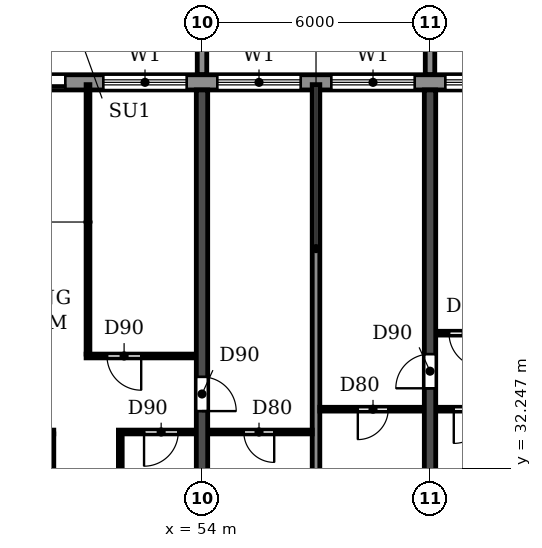
"""IFC4 building model, lengths in metres.
Left out: names, types, materials, properties, quantities, classifications, styles, units other than length and angle.
Written with IfcOpenShell. Run it as: python <this file> out.ifc"""

import sys

from ifc_helpers import new_model, si_unit, direction, frame, frame_2d, origin, place, context, subcontext, project, spatial, polyline, rectangle, outline, extrude, source, transform, mapped, element, fill, save


model = new_model("IFC4")
c1 = context("Model", 3, precision=1e-05, world=origin(), true_north=direction((0.0, 1.0)))
c2 = subcontext(c1, "Body", "Model", "MODEL_VIEW")
j1 = project(units=[si_unit("LENGTHUNIT", "METRE"), si_unit("PLANEANGLEUNIT", "RADIAN")], contexts=[c1])
p1 = place(None, origin())
s1 = spatial("IfcSite", under=j1, at=p1, CompositionType="ELEMENT")
p2 = place(p1, origin())
s2 = spatial("IfcBuilding", under=s1, at=p2, CompositionType="ELEMENT")
p3 = place(p2, frame((0.0, 0.0, 155.4)))
s3 = spatial("IfcBuildingStorey", under=s2, at=p3, CompositionType="ELEMENT", Elevation=155.4)
p4 = place(p3, frame((54.0, 30.525, 0.0), z_axis=(0.0, 0.0, 1.0), x_axis=(0.0, 1.0, 0.0)))
e1 = element("IfcWall", 1, at=p4, inside=s3, PredefinedType="SHEAR", context=c2, shape_type="SweptSolid", body=[
    extrude(rectangle(XDim=11.675, YDim=0.3, at=frame_2d((5.837, 0.0))), origin(), (0.0, 0.0, 1.0), 3.0),
])
p5 = place(p4, frame((3.225, 0.0, 0.0)))
e2 = element("IfcOpeningElement", 2, at=p5, cuts=e1, PredefinedType="OPENING", context=c2, shape_type="SweptSolid", body=[
    extrude(rectangle(XDim=0.9, YDim=2.1, at=frame_2d((0.45, 1.05))), frame((0.0, 0.16, 0.0), z_axis=(0.0, -1.0, 0.0), x_axis=(1.0, 0.0, 0.0)), (0.0, 0.0, 1.0), 0.32),
])
p6 = place(p3, frame((60.0, 30.525, 0.0), z_axis=(0.0, 0.0, 1.0), x_axis=(0.0, 1.0, 0.0)))
e3 = element("IfcWall", 3, at=p6, inside=s3, PredefinedType="SHEAR", context=c2, shape_type="SweptSolid", body=[
    extrude(rectangle(XDim=11.675, YDim=0.3, at=frame_2d((5.837, 0.0))), origin(), (0.0, 0.0, 1.0), 3.0),
])
p7 = place(p6, frame((3.825, 0.0, 0.0)))
e4 = element("IfcOpeningElement", 4, at=p7, cuts=e3, PredefinedType="OPENING", context=c2, shape_type="SweptSolid", body=[
    extrude(rectangle(XDim=0.9, YDim=2.1, at=frame_2d((0.45, 1.05))), frame((0.0, 0.16, 0.0), z_axis=(0.0, -1.0, 0.0), x_axis=(1.0, 0.0, 0.0)), (0.0, 0.0, 1.0), 0.32),
])
p8 = place(p3, frame((85.317, 42.4, 0.0), z_axis=(0.0, 0.0, 1.0), x_axis=(-1.0, 0.0, 0.0)))
e5 = element("IfcWall", 5, at=p8, inside=s3, PredefinedType="STANDARD", context=c2, shape_type="SweptSolid", body=[
    extrude(rectangle(XDim=68.634, YDim=0.4, at=frame_2d((34.317, 0.0))), origin(), (0.0, 0.0, 1.0), 3.0),
])
p9 = place(p8, frame((64.917, 0.0, 0.0)))
e6 = element("IfcOpeningElement", 6, at=p9, cuts=e5, PredefinedType="OPENING", context=c2, shape_type="SweptSolid", body=[
    extrude(rectangle(XDim=1.8, YDim=2.4, at=frame_2d((0.9, 1.2))), frame((0.0, 0.21, 0.0), z_axis=(0.0, -1.0, 0.0), x_axis=(1.0, 0.0, 0.0)), (0.0, 0.0, 1.0), 0.42),
])
p10 = place(p8, frame((61.717, 0.0, 0.9)))
e7 = element("IfcOpeningElement", 7, at=p10, cuts=e5, PredefinedType="OPENING", context=c2, shape_type="SweptSolid", body=[
    extrude(rectangle(XDim=2.2, YDim=1.5, at=frame_2d((1.1, 0.75))), frame((0.0, 0.21, 0.0), z_axis=(0.0, -1.0, 0.0), x_axis=(1.0, 0.0, 0.0)), (0.0, 0.0, 1.0), 0.42),
])
p11 = place(p8, frame((58.717, 0.0, 0.9)))
e8 = element("IfcOpeningElement", 8, at=p11, cuts=e5, PredefinedType="OPENING", context=c2, shape_type="SweptSolid", body=[
    extrude(rectangle(XDim=2.2, YDim=1.5, at=frame_2d((1.1, 0.75))), frame((0.0, 0.21, 0.0), z_axis=(0.0, -1.0, 0.0), x_axis=(1.0, 0.0, 0.0)), (0.0, 0.0, 1.0), 0.42),
])
p12 = place(p8, frame((55.917, 0.0, 0.0)))
e9 = element("IfcOpeningElement", 9, at=p12, cuts=e5, PredefinedType="OPENING", context=c2, shape_type="SweptSolid", body=[
    extrude(rectangle(XDim=1.8, YDim=2.4, at=frame_2d((0.9, 1.2))), frame((0.0, 0.21, 0.0), z_axis=(0.0, -1.0, 0.0), x_axis=(1.0, 0.0, 0.0)), (0.0, 0.0, 1.0), 0.42),
])
p13 = place(p8, frame((52.917, 0.0, 0.0)))
e10 = element("IfcOpeningElement", 10, at=p13, cuts=e5, PredefinedType="OPENING", context=c2, shape_type="SweptSolid", body=[
    extrude(rectangle(XDim=1.8, YDim=2.4, at=frame_2d((0.9, 1.2))), frame((0.0, 0.21, 0.0), z_axis=(0.0, -1.0, 0.0), x_axis=(1.0, 0.0, 0.0)), (0.0, 0.0, 1.0), 0.42),
])
p14 = place(p8, frame((49.717, 0.0, 0.9)))
e11 = element("IfcOpeningElement", 11, at=p14, cuts=e5, PredefinedType="OPENING", context=c2, shape_type="SweptSolid", body=[
    extrude(rectangle(XDim=2.2, YDim=1.5, at=frame_2d((1.1, 0.75))), frame((0.0, 0.21, 0.0), z_axis=(0.0, -1.0, 0.0), x_axis=(1.0, 0.0, 0.0)), (0.0, 0.0, 1.0), 0.42),
])
p15 = place(p8, frame((46.717, 0.0, 0.9)))
e12 = element("IfcOpeningElement", 12, at=p15, cuts=e5, PredefinedType="OPENING", context=c2, shape_type="SweptSolid", body=[
    extrude(rectangle(XDim=2.2, YDim=1.5, at=frame_2d((1.1, 0.75))), frame((0.0, 0.21, 0.0), z_axis=(0.0, -1.0, 0.0), x_axis=(1.0, 0.0, 0.0)), (0.0, 0.0, 1.0), 0.42),
])
p16 = place(p8, frame((43.717, 0.0, 0.9)))
e13 = element("IfcOpeningElement", 13, at=p16, cuts=e5, PredefinedType="OPENING", context=c2, shape_type="SweptSolid", body=[
    extrude(rectangle(XDim=2.2, YDim=1.5, at=frame_2d((1.1, 0.75))), frame((0.0, 0.21, 0.0), z_axis=(0.0, -1.0, 0.0), x_axis=(1.0, 0.0, 0.0)), (0.0, 0.0, 1.0), 0.42),
])
p17 = place(p8, frame((40.917, 0.0, 0.0)))
e14 = element("IfcOpeningElement", 14, at=p17, cuts=e5, PredefinedType="OPENING", context=c2, shape_type="SweptSolid", body=[
    extrude(rectangle(XDim=1.8, YDim=2.4, at=frame_2d((0.9, 1.2))), frame((0.0, 0.21, 0.0), z_axis=(0.0, -1.0, 0.0), x_axis=(1.0, 0.0, 0.0)), (0.0, 0.0, 1.0), 0.42),
])
p18 = place(p8, frame((37.717, 0.0, 0.9)))
e15 = element("IfcOpeningElement", 15, at=p18, cuts=e5, PredefinedType="OPENING", context=c2, shape_type="SweptSolid", body=[
    extrude(rectangle(XDim=2.2, YDim=1.5, at=frame_2d((1.1, 0.75))), frame((0.0, 0.21, 0.0), z_axis=(0.0, -1.0, 0.0), x_axis=(1.0, 0.0, 0.0)), (0.0, 0.0, 1.0), 0.42),
])
p19 = place(p8, frame((34.917, 0.0, 0.0)))
e16 = element("IfcOpeningElement", 16, at=p19, cuts=e5, PredefinedType="OPENING", context=c2, shape_type="SweptSolid", body=[
    extrude(rectangle(XDim=1.8, YDim=2.4, at=frame_2d((0.9, 1.2))), frame((0.0, 0.21, 0.0), z_axis=(0.0, -1.0, 0.0), x_axis=(1.0, 0.0, 0.0)), (0.0, 0.0, 1.0), 0.42),
])
p20 = place(p8, frame((31.717, 0.0, 0.9)))
e17 = element("IfcOpeningElement", 17, at=p20, cuts=e5, PredefinedType="OPENING", context=c2, shape_type="SweptSolid", body=[
    extrude(rectangle(XDim=2.2, YDim=1.5, at=frame_2d((1.1, 0.75))), frame((0.0, 0.21, 0.0), z_axis=(0.0, -1.0, 0.0), x_axis=(1.0, 0.0, 0.0)), (0.0, 0.0, 1.0), 0.42),
])
p21 = place(p8, frame((28.717, 0.0, 0.9)))
e18 = element("IfcOpeningElement", 18, at=p21, cuts=e5, PredefinedType="OPENING", context=c2, shape_type="SweptSolid", body=[
    extrude(rectangle(XDim=2.2, YDim=1.5, at=frame_2d((1.1, 0.75))), frame((0.0, 0.21, 0.0), z_axis=(0.0, -1.0, 0.0), x_axis=(1.0, 0.0, 0.0)), (0.0, 0.0, 1.0), 0.42),
])
p22 = place(p8, frame((25.717, 0.0, 0.9)))
e19 = element("IfcOpeningElement", 19, at=p22, cuts=e5, PredefinedType="OPENING", context=c2, shape_type="SweptSolid", body=[
    extrude(rectangle(XDim=2.2, YDim=1.5, at=frame_2d((1.1, 0.75))), frame((0.0, 0.21, 0.0), z_axis=(0.0, -1.0, 0.0), x_axis=(1.0, 0.0, 0.0)), (0.0, 0.0, 1.0), 0.42),
])
p23 = place(p8, frame((22.717, 0.0, 0.9)))
e20 = element("IfcOpeningElement", 20, at=p23, cuts=e5, PredefinedType="OPENING", context=c2, shape_type="SweptSolid", body=[
    extrude(rectangle(XDim=2.2, YDim=1.5, at=frame_2d((1.1, 0.75))), frame((0.0, 0.21, 0.0), z_axis=(0.0, -1.0, 0.0), x_axis=(1.0, 0.0, 0.0)), (0.0, 0.0, 1.0), 0.42),
])
p24 = place(p8, frame((19.917, 0.0, 0.0)))
e21 = element("IfcOpeningElement", 21, at=p24, cuts=e5, PredefinedType="OPENING", context=c2, shape_type="SweptSolid", body=[
    extrude(rectangle(XDim=1.8, YDim=2.4, at=frame_2d((0.9, 1.2))), frame((0.0, 0.21, 0.0), z_axis=(0.0, -1.0, 0.0), x_axis=(1.0, 0.0, 0.0)), (0.0, 0.0, 1.0), 0.42),
])
p25 = place(p8, frame((16.717, 0.0, 0.9)))
e22 = element("IfcOpeningElement", 22, at=p25, cuts=e5, PredefinedType="OPENING", context=c2, shape_type="SweptSolid", body=[
    extrude(rectangle(XDim=2.2, YDim=1.5, at=frame_2d((1.1, 0.75))), frame((0.0, 0.21, 0.0), z_axis=(0.0, -1.0, 0.0), x_axis=(1.0, 0.0, 0.0)), (0.0, 0.0, 1.0), 0.42),
])
p26 = place(p8, frame((13.717, 0.0, 0.9)))
e23 = element("IfcOpeningElement", 23, at=p26, cuts=e5, PredefinedType="OPENING", context=c2, shape_type="SweptSolid", body=[
    extrude(rectangle(XDim=2.2, YDim=1.5, at=frame_2d((1.1, 0.75))), frame((0.0, 0.21, 0.0), z_axis=(0.0, -1.0, 0.0), x_axis=(1.0, 0.0, 0.0)), (0.0, 0.0, 1.0), 0.42),
])
p27 = place(p8, frame((10.917, 0.0, 0.0)))
e24 = element("IfcOpeningElement", 24, at=p27, cuts=e5, PredefinedType="OPENING", context=c2, shape_type="SweptSolid", body=[
    extrude(rectangle(XDim=1.8, YDim=2.4, at=frame_2d((0.9, 1.2))), frame((0.0, 0.21, 0.0), z_axis=(0.0, -1.0, 0.0), x_axis=(1.0, 0.0, 0.0)), (0.0, 0.0, 1.0), 0.42),
])
p28 = place(p8, frame((7.717, 0.0, 0.9)))
e25 = element("IfcOpeningElement", 25, at=p28, cuts=e5, PredefinedType="OPENING", context=c2, shape_type="SweptSolid", body=[
    extrude(rectangle(XDim=2.2, YDim=1.5, at=frame_2d((1.1, 0.75))), frame((0.0, 0.21, 0.0), z_axis=(0.0, -1.0, 0.0), x_axis=(1.0, 0.0, 0.0)), (0.0, 0.0, 1.0), 0.42),
])
p29 = place(p8, frame((4.717, 0.0, 0.9)))
e26 = element("IfcOpeningElement", 26, at=p29, cuts=e5, PredefinedType="OPENING", context=c2, shape_type="SweptSolid", body=[
    extrude(rectangle(XDim=2.2, YDim=1.5, at=frame_2d((1.1, 0.75))), frame((0.0, 0.21, 0.0), z_axis=(0.0, -1.0, 0.0), x_axis=(1.0, 0.0, 0.0)), (0.0, 0.0, 1.0), 0.42),
])
p30 = place(p8, frame((1.917, 0.0, 0.0)))
e27 = element("IfcOpeningElement", 27, at=p30, cuts=e5, PredefinedType="OPENING", context=c2, shape_type="SweptSolid", body=[
    extrude(rectangle(XDim=1.8, YDim=2.4, at=frame_2d((0.9, 1.2))), frame((0.0, 0.21, 0.0), z_axis=(0.0, -1.0, 0.0), x_axis=(1.0, 0.0, 0.0)), (0.0, 0.0, 1.0), 0.42),
])
m1 = source(origin(), c2, "Body", "SweptSolid", [
    extrude(outline(polyline([(0.0, 0.0), (0.25, 0.0), (0.25, 3.1), (0.0, 3.1), (0.0, 0.0)])), origin(), (0.0, 0.0, 1.0), 3.1),
])
for number, where in (
    (28, (53.875, 42.6, 0.0)),
    (29, (59.875, 42.6, 0.0)),
):
    element("IfcWall", number, at=place(p3, frame(where)), inside=s3, PredefinedType="STANDARD", context=c2, shape_type="MappedRepresentation", body=[
        mapped(m1, transform((0.0, 0.0, 0.0))),
    ])
p31 = place(p3, frame((57.0, 30.535, 0.0), z_axis=(0.0, 0.0, 1.0), x_axis=(0.0, 1.0, 0.0)))
e30 = element("IfcWall", 30, at=p31, inside=s3, PredefinedType="PARTITIONING", context=c2, shape_type="SweptSolid", body=[
    extrude(rectangle(XDim=11.805, YDim=0.2, at=frame_2d((5.903, 0.0))), origin(), (0.0, 0.0, 1.0), 3.0),
])
p32 = place(p3, frame((48.16, 33.2, 0.0), z_axis=(0.0, 0.0, 1.0), x_axis=(1.0, 0.0, 0.0)))
e31 = element("IfcWall", 31, at=p32, inside=s3, PredefinedType="PARTITIONING", context=c2, shape_type="SweptSolid", body=[
    extrude(rectangle(XDim=1.94, YDim=0.1, at=frame_2d((0.97, 0.0))), origin(), (0.0, 0.0, 1.0), 3.0),
])
p33 = place(p32, frame((0.465, 0.0, 0.0)))
e32 = element("IfcOpeningElement", 32, at=p33, cuts=e31, PredefinedType="OPENING", context=c2, shape_type="SweptSolid", body=[
    extrude(rectangle(XDim=0.8, YDim=2.1, at=frame_2d((0.4, 1.05))), frame((0.0, 0.06, 0.0), z_axis=(0.0, -1.0, 0.0), x_axis=(1.0, 0.0, 0.0)), (0.0, 0.0, 1.0), 0.12),
])
p34 = place(p3, frame((51.8, 33.2, 0.0), z_axis=(0.0, 0.0, 1.0), x_axis=(1.0, 0.0, 0.0)))
e33 = element("IfcWall", 33, at=p34, inside=s3, PredefinedType="PARTITIONING", context=c2, shape_type="SweptSolid", body=[
    extrude(rectangle(XDim=2.04, YDim=0.1, at=frame_2d((1.02, 0.0))), origin(), (0.0, 0.0, 1.0), 3.0),
])
p35 = place(p34, frame((0.675, 0.0, 0.0)))
e34 = element("IfcOpeningElement", 34, at=p35, cuts=e33, PredefinedType="OPENING", context=c2, shape_type="SweptSolid", body=[
    extrude(rectangle(XDim=0.9, YDim=2.1, at=frame_2d((0.45, 1.05))), frame((0.0, 0.06, 0.0), z_axis=(0.0, -1.0, 0.0), x_axis=(1.0, 0.0, 0.0)), (0.0, 0.0, 1.0), 0.12),
])
p36 = place(p3, frame((54.16, 33.2, 0.0), z_axis=(0.0, 0.0, 1.0), x_axis=(1.0, 0.0, 0.0)))
e35 = element("IfcWall", 35, at=p36, inside=s3, PredefinedType="PARTITIONING", context=c2, shape_type="SweptSolid", body=[
    extrude(rectangle(XDim=2.74, YDim=0.1, at=frame_2d((1.37, 0.0))), origin(), (0.0, 0.0, 1.0), 3.0),
])
p37 = place(p36, frame((0.94, 0.0, 0.0)))
e36 = element("IfcOpeningElement", 36, at=p37, cuts=e35, PredefinedType="OPENING", context=c2, shape_type="SweptSolid", body=[
    extrude(rectangle(XDim=0.8, YDim=2.1, at=frame_2d((0.4, 1.05))), frame((0.0, 0.06, 0.0), z_axis=(0.0, -1.0, 0.0), x_axis=(1.0, 0.0, 0.0)), (0.0, 0.0, 1.0), 0.12),
])
p38 = place(p3, frame((57.1, 33.8, 0.0), z_axis=(0.0, 0.0, 1.0), x_axis=(1.0, 0.0, 0.0)))
e37 = element("IfcWall", 37, at=p38, inside=s3, PredefinedType="PARTITIONING", context=c2, shape_type="SweptSolid", body=[
    extrude(rectangle(XDim=2.74, YDim=0.1, at=frame_2d((1.37, 0.0))), origin(), (0.0, 0.0, 1.0), 3.0),
])
p39 = place(p38, frame((1.0, 0.0, 0.0)))
e38 = element("IfcOpeningElement", 38, at=p39, cuts=e37, PredefinedType="OPENING", context=c2, shape_type="SweptSolid", body=[
    extrude(rectangle(XDim=0.8, YDim=2.1, at=frame_2d((0.4, 1.05))), frame((0.0, 0.06, 0.0), z_axis=(0.0, -1.0, 0.0), x_axis=(1.0, 0.0, 0.0)), (0.0, 0.0, 1.0), 0.12),
])
p40 = place(p3, frame((60.16, 33.8, 0.0), z_axis=(0.0, 0.0, 1.0), x_axis=(1.0, 0.0, 0.0)))
e39 = element("IfcWall", 39, at=p40, inside=s3, PredefinedType="PARTITIONING", context=c2, shape_type="SweptSolid", body=[
    extrude(rectangle(XDim=2.04, YDim=0.1, at=frame_2d((1.02, 0.0))), origin(), (0.0, 0.0, 1.0), 3.0),
])
p41 = place(p40, frame((0.465, 0.0, 0.0)))
e40 = element("IfcOpeningElement", 40, at=p41, cuts=e39, PredefinedType="OPENING", context=c2, shape_type="SweptSolid", body=[
    extrude(rectangle(XDim=0.9, YDim=2.1, at=frame_2d((0.45, 1.05))), frame((0.0, 0.06, 0.0), z_axis=(0.0, -1.0, 0.0), x_axis=(1.0, 0.0, 0.0)), (0.0, 0.0, 1.0), 0.12),
])
p42 = place(p3, frame((50.95, 35.2, 0.0), z_axis=(0.0, 0.0, 1.0), x_axis=(1.0, 0.0, 0.0)))
e41 = element("IfcWall", 41, at=p42, inside=s3, PredefinedType="PARTITIONING", context=c2, shape_type="SweptSolid", body=[
    extrude(rectangle(XDim=2.89, YDim=0.1, at=frame_2d((1.445, 0.0))), origin(), (0.0, 0.0, 1.0), 3.0),
])
p43 = place(p42, frame((0.55, 0.0, 0.0)))
e42 = element("IfcOpeningElement", 42, at=p43, cuts=e41, PredefinedType="OPENING", context=c2, shape_type="SweptSolid", body=[
    extrude(rectangle(XDim=0.9, YDim=2.1, at=frame_2d((0.45, 1.05))), frame((0.0, 0.06, 0.0), z_axis=(0.0, -1.0, 0.0), x_axis=(1.0, 0.0, 0.0)), (0.0, 0.0, 1.0), 0.12),
])
p44 = place(p3, frame((60.16, 35.8, 0.0), z_axis=(0.0, 0.0, 1.0), x_axis=(1.0, 0.0, 0.0)))
e43 = element("IfcWall", 43, at=p44, inside=s3, PredefinedType="PARTITIONING", context=c2, shape_type="SweptSolid", body=[
    extrude(rectangle(XDim=2.89, YDim=0.1, at=frame_2d((1.445, 0.0))), origin(), (0.0, 0.0, 1.0), 3.0),
])
p45 = place(p44, frame((0.34, 0.0, 0.0)))
e44 = element("IfcOpeningElement", 44, at=p45, cuts=e43, PredefinedType="OPENING", context=c2, shape_type="SweptSolid", body=[
    extrude(rectangle(XDim=0.9, YDim=2.1, at=frame_2d((0.45, 1.05))), frame((0.0, 0.06, 0.0), z_axis=(0.0, -1.0, 0.0), x_axis=(1.0, 0.0, 0.0)), (0.0, 0.0, 1.0), 0.12),
])
p46 = place(p3, frame((50.05, 30.535, 0.0), z_axis=(0.0, 0.0, 1.0), x_axis=(0.0, 1.0, 0.0)))
e45 = element("IfcWall", 45, at=p46, inside=s3, PredefinedType="PARTITIONING", context=c2, shape_type="SweptSolid", body=[
    extrude(rectangle(XDim=2.615, YDim=0.1, at=frame_2d((1.308, 0.0))), origin(), (0.0, 0.0, 1.0), 3.0),
])
p47 = place(p3, frame((51.0, 35.25, 0.0), z_axis=(0.0, 0.0, 1.0), x_axis=(0.0, 1.0, 0.0)))
e46 = element("IfcWall", 46, at=p47, inside=s3, PredefinedType="PARTITIONING", context=c2, shape_type="SweptSolid", body=[
    extrude(rectangle(XDim=7.09, YDim=0.1, at=frame_2d((3.545, 0.0))), origin(), (0.0, 0.0, 1.0), 3.0),
])
p48 = place(p3, frame((51.85, 30.535, 0.0), z_axis=(0.0, 0.0, 1.0), x_axis=(0.0, 1.0, 0.0)))
e47 = element("IfcWall", 47, at=p48, inside=s3, PredefinedType="PARTITIONING", context=c2, shape_type="SweptSolid", body=[
    extrude(rectangle(XDim=2.615, YDim=0.1, at=frame_2d((1.308, 0.0))), origin(), (0.0, 0.0, 1.0), 3.0),
])
p49 = place(p19, origin())
e48 = element("IfcDoor", 48, at=p49, inside=s3, OperationType="DOUBLE_DOOR_SLIDING", PredefinedType="DOOR", context=c2, shape_type="SweptSolid", body=[
    extrude(rectangle(XDim=1.8, YDim=2.4, at=frame_2d((0.9, 1.2))), frame((0.0, 0.025, 0.0), z_axis=(0.0, -1.0, 0.0), x_axis=(1.0, 0.0, 0.0)), (0.0, 0.0, 1.0), 0.05),
])
fill(e16, e48)
p50 = place(p20, origin())
e49 = element("IfcWindow", 49, at=p50, inside=s3, PartitioningType="DOUBLE_PANEL_HORIZONTAL", PredefinedType="WINDOW", context=c2, shape_type="SweptSolid", body=[
    extrude(rectangle(XDim=2.2, YDim=1.5, at=frame_2d((1.1, 0.75))), frame((0.0, 0.03, 0.0), z_axis=(0.0, -1.0, 0.0), x_axis=(1.0, 0.0, 0.0)), (0.0, 0.0, 1.0), 0.06),
])
fill(e17, e49)
p51 = place(p21, origin())
e50 = element("IfcWindow", 50, at=p51, inside=s3, PartitioningType="DOUBLE_PANEL_HORIZONTAL", PredefinedType="WINDOW", context=c2, shape_type="SweptSolid", body=[
    extrude(rectangle(XDim=2.2, YDim=1.5, at=frame_2d((1.1, 0.75))), frame((0.0, 0.03, 0.0), z_axis=(0.0, -1.0, 0.0), x_axis=(1.0, 0.0, 0.0)), (0.0, 0.0, 1.0), 0.06),
])
fill(e18, e50)
p52 = place(p22, origin())
e51 = element("IfcWindow", 51, at=p52, inside=s3, PartitioningType="DOUBLE_PANEL_HORIZONTAL", PredefinedType="WINDOW", context=c2, shape_type="SweptSolid", body=[
    extrude(rectangle(XDim=2.2, YDim=1.5, at=frame_2d((1.1, 0.75))), frame((0.0, 0.03, 0.0), z_axis=(0.0, -1.0, 0.0), x_axis=(1.0, 0.0, 0.0)), (0.0, 0.0, 1.0), 0.06),
])
fill(e19, e51)
p53 = place(p23, origin())
e52 = element("IfcWindow", 52, at=p53, inside=s3, PartitioningType="DOUBLE_PANEL_HORIZONTAL", PredefinedType="WINDOW", context=c2, shape_type="SweptSolid", body=[
    extrude(rectangle(XDim=2.2, YDim=1.5, at=frame_2d((1.1, 0.75))), frame((0.0, 0.03, 0.0), z_axis=(0.0, -1.0, 0.0), x_axis=(1.0, 0.0, 0.0)), (0.0, 0.0, 1.0), 0.06),
])
fill(e20, e52)
p54 = place(p37, frame((0.8, 0.0, 0.0), z_axis=(0.0, 0.0, 1.0), x_axis=(-1.0, 0.0, 0.0)))
e53 = element("IfcDoor", 53, at=p54, inside=s3, OperationType="SINGLE_SWING_LEFT", PredefinedType="DOOR", context=c2, shape_type="SweptSolid", body=[
    extrude(rectangle(XDim=0.8, YDim=2.1, at=frame_2d((0.4, 1.05))), frame((0.0, 0.025, 0.0), z_axis=(0.0, -1.0, 0.0), x_axis=(1.0, 0.0, 0.0)), (0.0, 0.0, 1.0), 0.05),
])
fill(e36, e53)
p55 = place(p43, frame((0.9, 0.0, 0.0), z_axis=(0.0, 0.0, 1.0), x_axis=(-1.0, 0.0, 0.0)))
e54 = element("IfcDoor", 54, at=p55, inside=s3, OperationType="SINGLE_SWING_LEFT", PredefinedType="DOOR", context=c2, shape_type="SweptSolid", body=[
    extrude(rectangle(XDim=0.9, YDim=2.1, at=frame_2d((0.45, 1.05))), frame((0.0, 0.025, 0.0), z_axis=(0.0, -1.0, 0.0), x_axis=(1.0, 0.0, 0.0)), (0.0, 0.0, 1.0), 0.05),
])
fill(e42, e54)
p56 = place(p35, frame((0.9, 0.0, 0.0), z_axis=(0.0, 0.0, 1.0), x_axis=(-1.0, 0.0, 0.0)))
e55 = element("IfcDoor", 55, at=p56, inside=s3, OperationType="SINGLE_SWING_RIGHT", PredefinedType="DOOR", context=c2, shape_type="SweptSolid", body=[
    extrude(rectangle(XDim=0.9, YDim=2.1, at=frame_2d((0.45, 1.05))), frame((0.0, 0.025, 0.0), z_axis=(0.0, -1.0, 0.0), x_axis=(1.0, 0.0, 0.0)), (0.0, 0.0, 1.0), 0.05),
])
fill(e34, e55)
p57 = place(p5, frame((0.9, 0.0, 0.0), z_axis=(0.0, 0.0, 1.0), x_axis=(-1.0, 0.0, 0.0)))
e56 = element("IfcDoor", 56, at=p57, inside=s3, OperationType="SINGLE_SWING_RIGHT", PredefinedType="DOOR", context=c2, shape_type="SweptSolid", body=[
    extrude(rectangle(XDim=0.9, YDim=2.1, at=frame_2d((0.45, 1.05))), frame((0.0, 0.025, 0.0), z_axis=(0.0, -1.0, 0.0), x_axis=(1.0, 0.0, 0.0)), (0.0, 0.0, 1.0), 0.05),
])
fill(e2, e56)
p58 = place(p39, frame((0.8, 0.0, 0.0), z_axis=(0.0, 0.0, 1.0), x_axis=(-1.0, 0.0, 0.0)))
e57 = element("IfcDoor", 57, at=p58, inside=s3, OperationType="SINGLE_SWING_RIGHT", PredefinedType="DOOR", context=c2, shape_type="SweptSolid", body=[
    extrude(rectangle(XDim=0.8, YDim=2.1, at=frame_2d((0.4, 1.05))), frame((0.0, 0.025, 0.0), z_axis=(0.0, -1.0, 0.0), x_axis=(1.0, 0.0, 0.0)), (0.0, 0.0, 1.0), 0.05),
])
fill(e38, e57)
p59 = place(p7, origin())
e58 = element("IfcDoor", 58, at=p59, inside=s3, OperationType="SINGLE_SWING_LEFT", PredefinedType="DOOR", context=c2, shape_type="SweptSolid", body=[
    extrude(rectangle(XDim=0.9, YDim=2.1, at=frame_2d((0.45, 1.05))), frame((0.0, 0.025, 0.0), z_axis=(0.0, -1.0, 0.0), x_axis=(1.0, 0.0, 0.0)), (0.0, 0.0, 1.0), 0.05),
])
fill(e4, e58)
p60 = place(p45, frame((0.9, 0.0, 0.0), z_axis=(0.0, 0.0, 1.0), x_axis=(-1.0, 0.0, 0.0)))
e59 = element("IfcDoor", 59, at=p60, inside=s3, OperationType="SINGLE_SWING_LEFT", PredefinedType="DOOR", context=c2, shape_type="SweptSolid", body=[
    extrude(rectangle(XDim=0.9, YDim=2.1, at=frame_2d((0.45, 1.05))), frame((0.0, 0.025, 0.0), z_axis=(0.0, -1.0, 0.0), x_axis=(1.0, 0.0, 0.0)), (0.0, 0.0, 1.0), 0.05),
])
fill(e44, e59)
p61 = place(p41, frame((0.9, 0.0, 0.0), z_axis=(0.0, 0.0, 1.0), x_axis=(-1.0, 0.0, 0.0)))
e60 = element("IfcDoor", 60, at=p61, inside=s3, OperationType="SINGLE_SWING_RIGHT", PredefinedType="DOOR", context=c2, shape_type="SweptSolid", body=[
    extrude(rectangle(XDim=0.9, YDim=2.1, at=frame_2d((0.45, 1.05))), frame((0.0, 0.025, 0.0), z_axis=(0.0, -1.0, 0.0), x_axis=(1.0, 0.0, 0.0)), (0.0, 0.0, 1.0), 0.05),
])
fill(e40, e60)
save(model, sys.argv[1])
